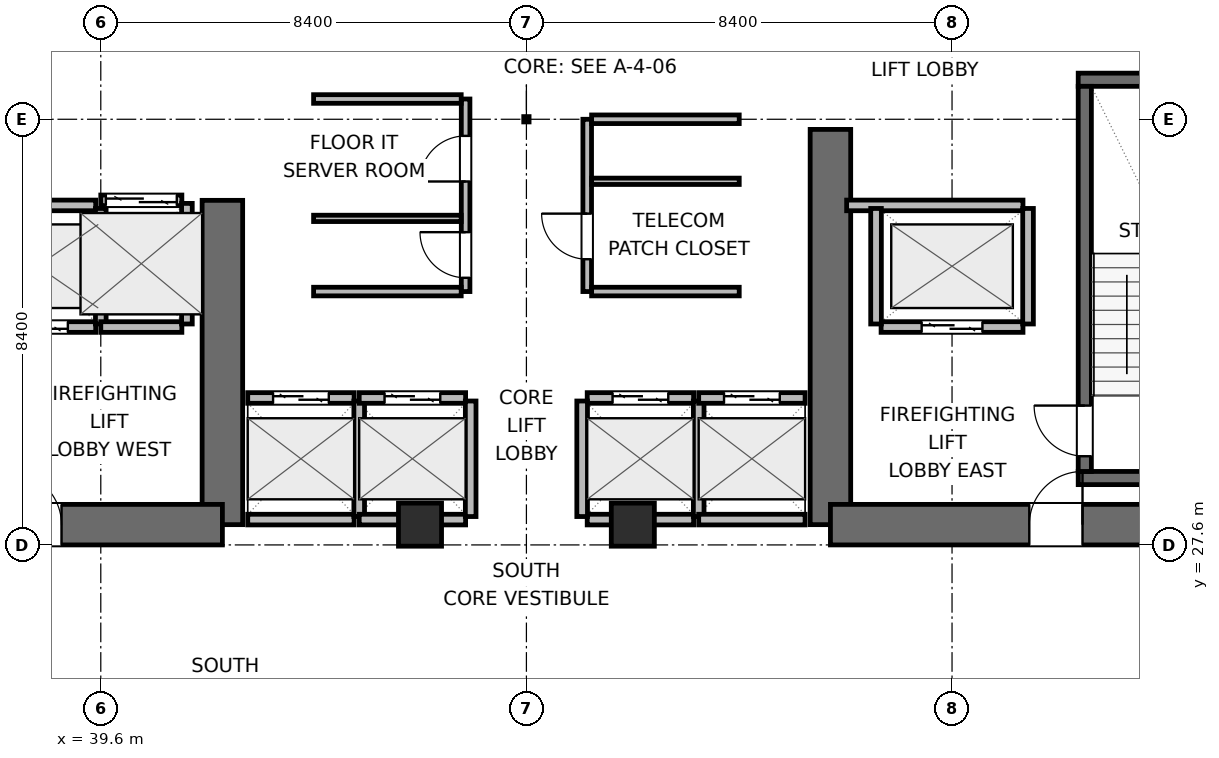
"""IFC4 building model, lengths in metres.
Left out: names, types, materials, properties, quantities, classifications, styles, units other than length and angle.
Written with IfcOpenShell. Run it as: python <this file> out.ifc"""

import sys

from ifc_helpers import new_model, si_unit, direction, frame, frame_2d, origin, origin_2d, place, context, subcontext, project, spatial, rectangle, extrude, element, fill, save


model = new_model("IFC4")
c1 = context("Model", 3, precision=1e-05, world=origin(), true_north=direction((0.0, 1.0)))
c2 = subcontext(c1, "Body", "Model", "MODEL_VIEW")
j1 = project(units=[si_unit("LENGTHUNIT", "METRE"), si_unit("PLANEANGLEUNIT", "RADIAN")], contexts=[c1])
p1 = place(None, origin())
s1 = spatial("IfcSite", under=j1, at=p1, CompositionType="ELEMENT")
p2 = place(p1, origin())
s2 = spatial("IfcBuilding", under=s1, at=p2, CompositionType="ELEMENT")
p3 = place(p2, frame((0.0, 0.0, 105.3)))
s3 = spatial("IfcBuildingStorey", under=s2, at=p3, CompositionType="ELEMENT", Elevation=105.3)
p4 = place(p3, frame((42.0, 28.0, 0.0), z_axis=(0.0, 0.0, 1.0), x_axis=(0.0, 1.0, 0.0)))
e1 = element("IfcWall", 1, at=p4, inside=s3, PredefinedType="SHEAR", context=c2, shape_type="SweptSolid", body=[
    extrude(rectangle(XDim=6.4, YDim=0.8, at=frame_2d((3.2, 0.0))), origin(), (0.0, 0.0, 1.0), 3.9),
])
p5 = place(p3, frame((32.8, 28.0, 0.0), z_axis=(0.0, 0.0, 1.0), x_axis=(1.0, 0.0, 0.0)))
e2 = element("IfcWall", 2, at=p5, inside=s3, PredefinedType="SHEAR", context=c2, shape_type="SweptSolid", body=[
    extrude(rectangle(XDim=9.2, YDim=0.8, at=frame_2d((4.6, 0.0))), origin(), (0.0, 0.0, 1.0), 3.9),
])
p6 = place(p5, frame((4.975, 0.0, 0.0)))
e3 = element("IfcOpeningElement", 3, at=p6, cuts=e2, PredefinedType="OPENING", context=c2, shape_type="SweptSolid", body=[
    extrude(rectangle(XDim=1.05, YDim=2.04, at=frame_2d((0.525, 1.02))), frame((0.0, 0.41, 0.0), z_axis=(0.0, -1.0, 0.0), x_axis=(1.0, 0.0, 0.0)), (0.0, 0.0, 1.0), 0.82),
])
p7 = place(p3, frame((54.0, 28.0, 0.0), z_axis=(0.0, 0.0, 1.0), x_axis=(0.0, 1.0, 0.0)))
e4 = element("IfcWall", 4, at=p7, inside=s3, PredefinedType="SHEAR", context=c2, shape_type="SweptSolid", body=[
    extrude(rectangle(XDim=7.8, YDim=0.8, at=frame_2d((3.9, 0.0))), origin(), (0.0, 0.0, 1.0), 3.9),
])
p8 = place(p3, frame((54.0, 28.0, 0.0), z_axis=(0.0, 0.0, 1.0), x_axis=(1.0, 0.0, 0.0)))
e5 = element("IfcWall", 5, at=p8, inside=s3, PredefinedType="SHEAR", context=c2, shape_type="SweptSolid", body=[
    extrude(rectangle(XDim=9.2, YDim=0.8, at=frame_2d((4.6, 0.0))), origin(), (0.0, 0.0, 1.0), 3.9),
])
p9 = place(p8, frame((3.925, 0.0, 0.0)))
e6 = element("IfcOpeningElement", 6, at=p9, cuts=e5, PredefinedType="OPENING", context=c2, shape_type="SweptSolid", body=[
    extrude(rectangle(XDim=1.05, YDim=2.04, at=frame_2d((0.525, 1.02))), frame((0.0, 0.41, 0.0), z_axis=(0.0, -1.0, 0.0), x_axis=(1.0, 0.0, 0.0)), (0.0, 0.0, 1.0), 0.82),
])
for number, where, z_axis, x_axis in (
    (7, (58.89, 28.92, 0.0), (0.0, 0.0, 1.0), (1.0, 0.0, 0.0)),
    (8, (58.89, 36.78, 0.0), (0.0, 0.0, 1.0), (1.0, 0.0, 0.0)),
):
    element("IfcWall", number, at=place(p3, frame(where, z_axis=z_axis, x_axis=x_axis)), inside=s3, PredefinedType="SHEAR", context=c2, shape_type="SweptSolid", body=[
        extrude(rectangle(XDim=3.91, YDim=0.26, at=frame_2d((1.955, 0.0))), origin(), (0.0, 0.0, 1.0), 3.9),
    ])
p10 = place(p3, frame((59.02, 29.05, 0.0), z_axis=(0.0, 0.0, 1.0), x_axis=(0.0, 1.0, 0.0)))
e9 = element("IfcWall", 9, at=p10, inside=s3, PredefinedType="SHEAR", context=c2, shape_type="SweptSolid", body=[
    extrude(rectangle(XDim=7.6, YDim=0.26, at=frame_2d((3.8, 0.0))), origin(), (0.0, 0.0, 1.0), 3.9),
])
p11 = place(p10, frame((0.3, 0.0, 0.0)))
e10 = element("IfcOpeningElement", 10, at=p11, cuts=e9, PredefinedType="OPENING", context=c2, shape_type="SweptSolid", body=[
    extrude(rectangle(XDim=1.0, YDim=2.04, at=frame_2d((0.5, 1.02))), frame((0.0, 0.14, 0.0), z_axis=(0.0, -1.0, 0.0), x_axis=(1.0, 0.0, 0.0)), (0.0, 0.0, 1.0), 0.28),
])
for number, where, z_axis, x_axis in (
    (11, (45.9, 28.0, 0.0), (0.0, 0.0, 1.0), (1.0, 0.0, 0.0)),
    (12, (50.1, 28.0, 0.0), (0.0, 0.0, 1.0), (1.0, 0.0, 0.0)),
):
    element("IfcColumn", number, at=place(p3, frame(where, z_axis=z_axis, x_axis=x_axis)), inside=s3, PredefinedType="COLUMN", context=c2, shape_type="SweptSolid", body=[
        extrude(rectangle(XDim=0.85, YDim=0.85, at=origin_2d()), origin(), (0.0, 0.0, 1.0), 3.9),
    ])
p12 = place(p3, frame((37.2, 31.9, 0.0), z_axis=(0.0, 0.0, 1.0), x_axis=(1.0, 0.0, 0.0)))
e13 = element("IfcWall", 13, at=p12, inside=s3, PredefinedType="PARTITIONING", context=c2, shape_type="SweptSolid", body=[
    extrude(rectangle(XDim=2.3, YDim=0.21, at=frame_2d((1.15, 0.0))), origin(), (0.0, 0.0, 1.0), 3.64),
])
p13 = place(p12, frame((0.55, 0.0, 0.0)))
e14 = element("IfcOpeningElement", 14, at=p13, cuts=e13, PredefinedType="OPENING", context=c2, shape_type="SweptSolid", body=[
    extrude(rectangle(XDim=1.2, YDim=2.04, at=frame_2d((0.6, 1.02))), frame((0.0, 0.115, 0.0), z_axis=(0.0, -1.0, 0.0), x_axis=(1.0, 0.0, 0.0)), (0.0, 0.0, 1.0), 0.23),
])
p14 = place(p3, frame((37.2, 34.3, 0.0), z_axis=(0.0, 0.0, 1.0), x_axis=(1.0, 0.0, 0.0)))
e15 = element("IfcWall", 15, at=p14, inside=s3, PredefinedType="PARTITIONING", context=c2, shape_type="SweptSolid", body=[
    extrude(rectangle(XDim=2.3, YDim=0.21, at=frame_2d((1.15, 0.0))), origin(), (0.0, 0.0, 1.0), 3.64),
])
p15 = place(p3, frame((39.6, 31.96, 0.0), z_axis=(0.0, 0.0, 1.0), x_axis=(0.0, 1.0, 0.0)))
e16 = element("IfcWall", 16, at=p15, inside=s3, PredefinedType="PARTITIONING", context=c2, shape_type="SweptSolid", body=[
    extrude(rectangle(XDim=2.28, YDim=0.21, at=frame_2d((1.14, 0.0))), origin(), (0.0, 0.0, 1.0), 3.64),
])
p16 = place(p3, frame((55.0, 31.9, 0.0), z_axis=(0.0, 0.0, 1.0), x_axis=(1.0, 0.0, 0.0)))
e17 = element("IfcWall", 17, at=p16, inside=s3, PredefinedType="PARTITIONING", context=c2, shape_type="SweptSolid", body=[
    extrude(rectangle(XDim=2.8, YDim=0.21, at=frame_2d((1.4, 0.0))), origin(), (0.0, 0.0, 1.0), 3.64),
])
p17 = place(p16, frame((0.8, 0.0, 0.0)))
e18 = element("IfcOpeningElement", 18, at=p17, cuts=e17, PredefinedType="OPENING", context=c2, shape_type="SweptSolid", body=[
    extrude(rectangle(XDim=1.2, YDim=2.04, at=frame_2d((0.6, 1.02))), frame((0.0, 0.115, 0.0), z_axis=(0.0, -1.0, 0.0), x_axis=(1.0, 0.0, 0.0)), (0.0, 0.0, 1.0), 0.23),
])
p18 = place(p3, frame((54.32, 34.3, 0.0), z_axis=(0.0, 0.0, 1.0), x_axis=(1.0, 0.0, 0.0)))
e19 = element("IfcWall", 19, at=p18, inside=s3, PredefinedType="PARTITIONING", context=c2, shape_type="SweptSolid", body=[
    extrude(rectangle(XDim=3.48, YDim=0.21, at=frame_2d((1.74, 0.0))), origin(), (0.0, 0.0, 1.0), 3.64),
])
for number, where, z_axis, x_axis in (
    (20, (54.9, 31.96, 0.0), (0.0, 0.0, 1.0), (0.0, 1.0, 0.0)),
    (21, (57.9, 31.96, 0.0), (0.0, 0.0, 1.0), (0.0, 1.0, 0.0)),
):
    element("IfcWall", number, at=place(p3, frame(where, z_axis=z_axis, x_axis=x_axis)), inside=s3, PredefinedType="PARTITIONING", context=c2, shape_type="SweptSolid", body=[
        extrude(rectangle(XDim=2.28, YDim=0.21, at=frame_2d((1.14, 0.0))), origin(), (0.0, 0.0, 1.0), 3.64),
    ])
p19 = place(p3, frame((39.6, 34.4, 0.0), z_axis=(0.0, 0.0, 1.0), x_axis=(1.0, 0.0, 0.0)))
e22 = element("IfcWall", 22, at=p19, inside=s3, PredefinedType="PARTITIONING", context=c2, shape_type="SweptSolid", body=[
    extrude(rectangle(XDim=1.6, YDim=0.21, at=frame_2d((0.8, 0.0))), origin(), (0.0, 0.0, 1.0), 3.64),
])
p20 = place(p19, frame((0.1, 0.0, 0.0)))
e23 = element("IfcOpeningElement", 23, at=p20, cuts=e22, PredefinedType="OPENING", context=c2, shape_type="SweptSolid", body=[
    extrude(rectangle(XDim=1.4, YDim=2.06, at=frame_2d((0.7, 1.03))), frame((0.0, 0.115, 0.0), z_axis=(0.0, -1.0, 0.0), x_axis=(1.0, 0.0, 0.0)), (0.0, 0.0, 1.0), 0.23),
])
p21 = place(p3, frame((39.6, 31.9, 0.0), z_axis=(0.0, 0.0, 1.0), x_axis=(1.0, 0.0, 0.0)))
e24 = element("IfcWall", 24, at=p21, inside=s3, PredefinedType="PARTITIONING", context=c2, shape_type="SweptSolid", body=[
    extrude(rectangle(XDim=1.6, YDim=0.21, at=frame_2d((0.8, 0.0))), origin(), (0.0, 0.0, 1.0), 3.64),
])
p22 = place(p3, frame((41.3, 31.96, 0.0), z_axis=(0.0, 0.0, 1.0), x_axis=(0.0, 1.0, 0.0)))
e25 = element("IfcWall", 25, at=p22, inside=s3, PredefinedType="PARTITIONING", context=c2, shape_type="SweptSolid", body=[
    extrude(rectangle(XDim=2.38, YDim=0.21, at=frame_2d((1.19, 0.0))), origin(), (0.0, 0.0, 1.0), 3.64),
])
p23 = place(p3, frame((42.5, 30.5, 0.0), z_axis=(0.0, 0.0, 1.0), x_axis=(1.0, 0.0, 0.0)))
e26 = element("IfcWall", 26, at=p23, inside=s3, PredefinedType="PARTITIONING", context=c2, shape_type="SweptSolid", body=[
    extrude(rectangle(XDim=2.1, YDim=0.21, at=frame_2d((1.05, 0.0))), origin(), (0.0, 0.0, 1.0), 3.64),
])
p24 = place(p23, frame((0.5, 0.0, 0.0)))
e27 = element("IfcOpeningElement", 27, at=p24, cuts=e26, PredefinedType="OPENING", context=c2, shape_type="SweptSolid", body=[
    extrude(rectangle(XDim=1.1, YDim=2.04, at=frame_2d((0.55, 1.02))), frame((0.0, 0.115, 0.0), z_axis=(0.0, -1.0, 0.0), x_axis=(1.0, 0.0, 0.0)), (0.0, 0.0, 1.0), 0.23),
])
p25 = place(p3, frame((42.5, 28.1, 0.0), z_axis=(0.0, 0.0, 1.0), x_axis=(1.0, 0.0, 0.0)))
e28 = element("IfcWall", 28, at=p25, inside=s3, PredefinedType="PARTITIONING", context=c2, shape_type="SweptSolid", body=[
    extrude(rectangle(XDim=2.1, YDim=0.21, at=frame_2d((1.05, 0.0))), origin(), (0.0, 0.0, 1.0), 2.525),
])
p26 = place(p3, frame((44.7, 28.16, 0.0), z_axis=(0.0, 0.0, 1.0), x_axis=(0.0, 1.0, 0.0)))
e29 = element("IfcWall", 29, at=p26, inside=s3, PredefinedType="PARTITIONING", context=c2, shape_type="SweptSolid", body=[
    extrude(rectangle(XDim=2.28, YDim=0.21, at=frame_2d((1.14, 0.0))), origin(), (0.0, 0.0, 1.0), 3.64),
])
p27 = place(p3, frame((44.7, 30.5, 0.0), z_axis=(0.0, 0.0, 1.0), x_axis=(1.0, 0.0, 0.0)))
e30 = element("IfcWall", 30, at=p27, inside=s3, PredefinedType="PARTITIONING", context=c2, shape_type="SweptSolid", body=[
    extrude(rectangle(XDim=2.1, YDim=0.21, at=frame_2d((1.05, 0.0))), origin(), (0.0, 0.0, 1.0), 3.64),
])
p28 = place(p27, frame((0.5, 0.0, 0.0)))
e31 = element("IfcOpeningElement", 31, at=p28, cuts=e30, PredefinedType="OPENING", context=c2, shape_type="SweptSolid", body=[
    extrude(rectangle(XDim=1.1, YDim=2.04, at=frame_2d((0.55, 1.02))), frame((0.0, 0.115, 0.0), z_axis=(0.0, -1.0, 0.0), x_axis=(1.0, 0.0, 0.0)), (0.0, 0.0, 1.0), 0.23),
])
p29 = place(p3, frame((44.7, 28.1, 0.0), z_axis=(0.0, 0.0, 1.0), x_axis=(1.0, 0.0, 0.0)))
e32 = element("IfcWall", 32, at=p29, inside=s3, PredefinedType="PARTITIONING", context=c2, shape_type="SweptSolid", body=[
    extrude(rectangle(XDim=2.1, YDim=0.21, at=frame_2d((1.05, 0.0))), origin(), (0.0, 0.0, 1.0), 2.525),
])
p30 = place(p3, frame((46.9, 28.16, 0.0), z_axis=(0.0, 0.0, 1.0), x_axis=(0.0, 1.0, 0.0)))
e33 = element("IfcWall", 33, at=p30, inside=s3, PredefinedType="PARTITIONING", context=c2, shape_type="SweptSolid", body=[
    extrude(rectangle(XDim=2.28, YDim=0.21, at=frame_2d((1.14, 0.0))), origin(), (0.0, 0.0, 1.0), 3.64),
])
p31 = place(p3, frame((49.2, 30.5, 0.0), z_axis=(0.0, 0.0, 1.0), x_axis=(1.0, 0.0, 0.0)))
e34 = element("IfcWall", 34, at=p31, inside=s3, PredefinedType="PARTITIONING", context=c2, shape_type="SweptSolid", body=[
    extrude(rectangle(XDim=2.1, YDim=0.21, at=frame_2d((1.05, 0.0))), origin(), (0.0, 0.0, 1.0), 3.64),
])
p32 = place(p31, frame((0.5, 0.0, 0.0)))
e35 = element("IfcOpeningElement", 35, at=p32, cuts=e34, PredefinedType="OPENING", context=c2, shape_type="SweptSolid", body=[
    extrude(rectangle(XDim=1.1, YDim=2.04, at=frame_2d((0.55, 1.02))), frame((0.0, 0.115, 0.0), z_axis=(0.0, -1.0, 0.0), x_axis=(1.0, 0.0, 0.0)), (0.0, 0.0, 1.0), 0.23),
])
p33 = place(p3, frame((49.2, 28.1, 0.0), z_axis=(0.0, 0.0, 1.0), x_axis=(1.0, 0.0, 0.0)))
e36 = element("IfcWall", 36, at=p33, inside=s3, PredefinedType="PARTITIONING", context=c2, shape_type="SweptSolid", body=[
    extrude(rectangle(XDim=2.1, YDim=0.21, at=frame_2d((1.05, 0.0))), origin(), (0.0, 0.0, 1.0), 2.525),
])
for number, where, z_axis, x_axis in (
    (37, (49.1, 28.16, 0.0), (0.0, 0.0, 1.0), (0.0, 1.0, 0.0)),
    (38, (51.4, 28.16, 0.0), (0.0, 0.0, 1.0), (0.0, 1.0, 0.0)),
):
    element("IfcWall", number, at=place(p3, frame(where, z_axis=z_axis, x_axis=x_axis)), inside=s3, PredefinedType="PARTITIONING", context=c2, shape_type="SweptSolid", body=[
        extrude(rectangle(XDim=2.28, YDim=0.21, at=frame_2d((1.14, 0.0))), origin(), (0.0, 0.0, 1.0), 3.64),
    ])
p34 = place(p3, frame((51.4, 30.5, 0.0), z_axis=(0.0, 0.0, 1.0), x_axis=(1.0, 0.0, 0.0)))
e39 = element("IfcWall", 39, at=p34, inside=s3, PredefinedType="PARTITIONING", context=c2, shape_type="SweptSolid", body=[
    extrude(rectangle(XDim=2.1, YDim=0.21, at=frame_2d((1.05, 0.0))), origin(), (0.0, 0.0, 1.0), 3.64),
])
p35 = place(p34, frame((0.5, 0.0, 0.0)))
e40 = element("IfcOpeningElement", 40, at=p35, cuts=e39, PredefinedType="OPENING", context=c2, shape_type="SweptSolid", body=[
    extrude(rectangle(XDim=1.1, YDim=2.04, at=frame_2d((0.55, 1.02))), frame((0.0, 0.115, 0.0), z_axis=(0.0, -1.0, 0.0), x_axis=(1.0, 0.0, 0.0)), (0.0, 0.0, 1.0), 0.23),
])
p36 = place(p3, frame((51.4, 28.1, 0.0), z_axis=(0.0, 0.0, 1.0), x_axis=(1.0, 0.0, 0.0)))
e41 = element("IfcWall", 41, at=p36, inside=s3, PredefinedType="PARTITIONING", context=c2, shape_type="SweptSolid", body=[
    extrude(rectangle(XDim=2.1, YDim=0.21, at=frame_2d((1.05, 0.0))), origin(), (0.0, 0.0, 1.0), 2.525),
])
p37 = place(p3, frame((46.8, 32.6, 0.0), z_axis=(0.0, 0.0, 1.0), x_axis=(0.0, 1.0, 0.0)))
e42 = element("IfcWall", 42, at=p37, inside=s3, PredefinedType="PARTITIONING", context=c2, shape_type="SweptSolid", body=[
    extrude(rectangle(XDim=3.8, YDim=0.17, at=frame_2d((1.9, 0.0))), origin(), (0.0, 0.0, 1.0), 3.64),
])
p38 = place(p37, frame((0.272, 0.0, 0.0)))
e43 = element("IfcOpeningElement", 43, at=p38, cuts=e42, PredefinedType="OPENING", context=c2, shape_type="SweptSolid", body=[
    extrude(rectangle(XDim=0.9, YDim=2.02, at=frame_2d((0.45, 1.01))), frame((0.0, 0.095, 0.0), z_axis=(0.0, -1.0, 0.0), x_axis=(1.0, 0.0, 0.0)), (0.0, 0.0, 1.0), 0.19),
])
p39 = place(p37, frame((2.172, 0.0, 0.0)))
e44 = element("IfcOpeningElement", 44, at=p39, cuts=e42, PredefinedType="OPENING", context=c2, shape_type="SweptSolid", body=[
    extrude(rectangle(XDim=0.9, YDim=2.02, at=frame_2d((0.45, 1.01))), frame((0.0, 0.095, 0.0), z_axis=(0.0, -1.0, 0.0), x_axis=(1.0, 0.0, 0.0)), (0.0, 0.0, 1.0), 0.19),
])
for number, where, z_axis, x_axis in (
    (45, (43.8, 32.6, 0.0), (0.0, 0.0, 1.0), (1.0, 0.0, 0.0)),
    (46, (43.8, 36.4, 0.0), (0.0, 0.0, 1.0), (1.0, 0.0, 0.0)),
):
    element("IfcWall", number, at=place(p3, frame(where, z_axis=z_axis, x_axis=x_axis)), inside=s3, PredefinedType="PARTITIONING", context=c2, shape_type="SweptSolid", body=[
        extrude(rectangle(XDim=2.913, YDim=0.17, at=frame_2d((1.457, 0.0))), origin(), (0.0, 0.0, 1.0), 3.64),
    ])
p40 = place(p3, frame((43.8, 34.044, 0.0), z_axis=(0.0, 0.0, 1.0), x_axis=(1.0, 0.0, 0.0)))
e47 = element("IfcWall", 47, at=p40, inside=s3, PredefinedType="PARTITIONING", context=c2, shape_type="SweptSolid", body=[
    extrude(rectangle(XDim=2.913, YDim=0.125, at=frame_2d((1.457, 0.0))), origin(), (0.0, 0.0, 1.0), 3.64),
])
p41 = place(p3, frame((49.2, 32.6, 0.0), z_axis=(0.0, 0.0, 1.0), x_axis=(0.0, 1.0, 0.0)))
e48 = element("IfcWall", 48, at=p41, inside=s3, PredefinedType="PARTITIONING", context=c2, shape_type="SweptSolid", body=[
    extrude(rectangle(XDim=3.4, YDim=0.17, at=frame_2d((1.7, 0.0))), origin(), (0.0, 0.0, 1.0), 3.64),
])
p42 = place(p41, frame((0.638, 0.0, 0.0)))
e49 = element("IfcOpeningElement", 49, at=p42, cuts=e48, PredefinedType="OPENING", context=c2, shape_type="SweptSolid", body=[
    extrude(rectangle(XDim=0.9, YDim=2.02, at=frame_2d((0.45, 1.01))), frame((0.0, 0.095, 0.0), z_axis=(0.0, -1.0, 0.0), x_axis=(1.0, 0.0, 0.0)), (0.0, 0.0, 1.0), 0.19),
])
for number, where, z_axis, x_axis in (
    (50, (49.287, 32.6, 0.0), (0.0, 0.0, 1.0), (1.0, 0.0, 0.0)),
    (51, (49.287, 36.0, 0.0), (0.0, 0.0, 1.0), (1.0, 0.0, 0.0)),
):
    element("IfcWall", number, at=place(p3, frame(where, z_axis=z_axis, x_axis=x_axis)), inside=s3, PredefinedType="PARTITIONING", context=c2, shape_type="SweptSolid", body=[
        extrude(rectangle(XDim=2.913, YDim=0.17, at=frame_2d((1.457, 0.0))), origin(), (0.0, 0.0, 1.0), 3.64),
    ])
p43 = place(p3, frame((49.287, 34.776, 0.0), z_axis=(0.0, 0.0, 1.0), x_axis=(1.0, 0.0, 0.0)))
e52 = element("IfcWall", 52, at=p43, inside=s3, PredefinedType="PARTITIONING", context=c2, shape_type="SweptSolid", body=[
    extrude(rectangle(XDim=2.913, YDim=0.125, at=frame_2d((1.457, 0.0))), origin(), (0.0, 0.0, 1.0), 3.64),
])
p44 = place(p11, origin())
e53 = element("IfcDoor", 53, at=p44, inside=s3, OperationType="SINGLE_SWING_RIGHT", PredefinedType="DOOR", context=c2, shape_type="SweptSolid", body=[
    extrude(rectangle(XDim=1.0, YDim=2.04, at=frame_2d((0.5, 1.02))), frame((0.0, 0.025, 0.0), z_axis=(0.0, -1.0, 0.0), x_axis=(1.0, 0.0, 0.0)), (0.0, 0.0, 1.0), 0.05),
])
fill(e10, e53)
p45 = place(p13, origin())
e54 = element("IfcDoor", 54, at=p45, inside=s3, OperationType="DOUBLE_DOOR_SLIDING", PredefinedType="DOOR", context=c2, shape_type="SweptSolid", body=[
    extrude(rectangle(XDim=1.2, YDim=2.04, at=frame_2d((0.6, 1.02))), frame((0.0, 0.025, 0.0), z_axis=(0.0, -1.0, 0.0), x_axis=(1.0, 0.0, 0.0)), (0.0, 0.0, 1.0), 0.05),
])
fill(e14, e54)
p46 = place(p17, origin())
e55 = element("IfcDoor", 55, at=p46, inside=s3, OperationType="DOUBLE_DOOR_SLIDING", PredefinedType="DOOR", context=c2, shape_type="SweptSolid", body=[
    extrude(rectangle(XDim=1.2, YDim=2.04, at=frame_2d((0.6, 1.02))), frame((0.0, 0.025, 0.0), z_axis=(0.0, -1.0, 0.0), x_axis=(1.0, 0.0, 0.0)), (0.0, 0.0, 1.0), 0.05),
])
fill(e18, e55)
p47 = place(p20, origin())
e56 = element("IfcDoor", 56, at=p47, inside=s3, OperationType="DOUBLE_DOOR_SLIDING", PredefinedType="DOOR", context=c2, shape_type="SweptSolid", body=[
    extrude(rectangle(XDim=1.4, YDim=2.06, at=frame_2d((0.7, 1.03))), frame((0.0, 0.025, 0.0), z_axis=(0.0, -1.0, 0.0), x_axis=(1.0, 0.0, 0.0)), (0.0, 0.0, 1.0), 0.05),
])
fill(e23, e56)
p48 = place(p24, origin())
e57 = element("IfcDoor", 57, at=p48, inside=s3, OperationType="DOUBLE_DOOR_SLIDING", PredefinedType="DOOR", context=c2, shape_type="SweptSolid", body=[
    extrude(rectangle(XDim=1.1, YDim=2.04, at=frame_2d((0.55, 1.02))), frame((0.0, 0.025, 0.0), z_axis=(0.0, -1.0, 0.0), x_axis=(1.0, 0.0, 0.0)), (0.0, 0.0, 1.0), 0.05),
])
fill(e27, e57)
p49 = place(p28, origin())
e58 = element("IfcDoor", 58, at=p49, inside=s3, OperationType="DOUBLE_DOOR_SLIDING", PredefinedType="DOOR", context=c2, shape_type="SweptSolid", body=[
    extrude(rectangle(XDim=1.1, YDim=2.04, at=frame_2d((0.55, 1.02))), frame((0.0, 0.025, 0.0), z_axis=(0.0, -1.0, 0.0), x_axis=(1.0, 0.0, 0.0)), (0.0, 0.0, 1.0), 0.05),
])
fill(e31, e58)
p50 = place(p32, origin())
e59 = element("IfcDoor", 59, at=p50, inside=s3, OperationType="DOUBLE_DOOR_SLIDING", PredefinedType="DOOR", context=c2, shape_type="SweptSolid", body=[
    extrude(rectangle(XDim=1.1, YDim=2.04, at=frame_2d((0.55, 1.02))), frame((0.0, 0.025, 0.0), z_axis=(0.0, -1.0, 0.0), x_axis=(1.0, 0.0, 0.0)), (0.0, 0.0, 1.0), 0.05),
])
fill(e35, e59)
p51 = place(p35, origin())
e60 = element("IfcDoor", 60, at=p51, inside=s3, OperationType="DOUBLE_DOOR_SLIDING", PredefinedType="DOOR", context=c2, shape_type="SweptSolid", body=[
    extrude(rectangle(XDim=1.1, YDim=2.04, at=frame_2d((0.55, 1.02))), frame((0.0, 0.025, 0.0), z_axis=(0.0, -1.0, 0.0), x_axis=(1.0, 0.0, 0.0)), (0.0, 0.0, 1.0), 0.05),
])
fill(e40, e60)
p52 = place(p6, origin())
e61 = element("IfcDoor", 61, at=p52, inside=s3, OperationType="SINGLE_SWING_LEFT", PredefinedType="DOOR", context=c2, shape_type="SweptSolid", body=[
    extrude(rectangle(XDim=1.05, YDim=2.04, at=frame_2d((0.525, 1.02))), frame((0.0, 0.025, 0.0), z_axis=(0.0, -1.0, 0.0), x_axis=(1.0, 0.0, 0.0)), (0.0, 0.0, 1.0), 0.05),
])
fill(e3, e61)
p53 = place(p9, origin())
e62 = element("IfcDoor", 62, at=p53, inside=s3, OperationType="SINGLE_SWING_RIGHT", PredefinedType="DOOR", context=c2, shape_type="SweptSolid", body=[
    extrude(rectangle(XDim=1.05, YDim=2.04, at=frame_2d((0.525, 1.02))), frame((0.0, 0.025, 0.0), z_axis=(0.0, -1.0, 0.0), x_axis=(1.0, 0.0, 0.0)), (0.0, 0.0, 1.0), 0.05),
])
fill(e6, e62)
p54 = place(p38, origin())
e63 = element("IfcDoor", 63, at=p54, inside=s3, OperationType="SINGLE_SWING_RIGHT", PredefinedType="DOOR", context=c2, shape_type="SweptSolid", body=[
    extrude(rectangle(XDim=0.9, YDim=2.02, at=frame_2d((0.45, 1.01))), frame((0.0, 0.025, 0.0), z_axis=(0.0, -1.0, 0.0), x_axis=(1.0, 0.0, 0.0)), (0.0, 0.0, 1.0), 0.05),
])
fill(e43, e63)
p55 = place(p39, origin())
e64 = element("IfcDoor", 64, at=p55, inside=s3, OperationType="SINGLE_SWING_LEFT", PredefinedType="DOOR", context=c2, shape_type="SweptSolid", body=[
    extrude(rectangle(XDim=0.9, YDim=2.02, at=frame_2d((0.45, 1.01))), frame((0.0, 0.025, 0.0), z_axis=(0.0, -1.0, 0.0), x_axis=(1.0, 0.0, 0.0)), (0.0, 0.0, 1.0), 0.05),
])
fill(e44, e64)
p56 = place(p42, origin())
e65 = element("IfcDoor", 65, at=p56, inside=s3, OperationType="SINGLE_SWING_RIGHT", PredefinedType="DOOR", context=c2, shape_type="SweptSolid", body=[
    extrude(rectangle(XDim=0.9, YDim=2.02, at=frame_2d((0.45, 1.01))), frame((0.0, 0.025, 0.0), z_axis=(0.0, -1.0, 0.0), x_axis=(1.0, 0.0, 0.0)), (0.0, 0.0, 1.0), 0.05),
])
fill(e49, e65)
save(model, sys.argv[1])
